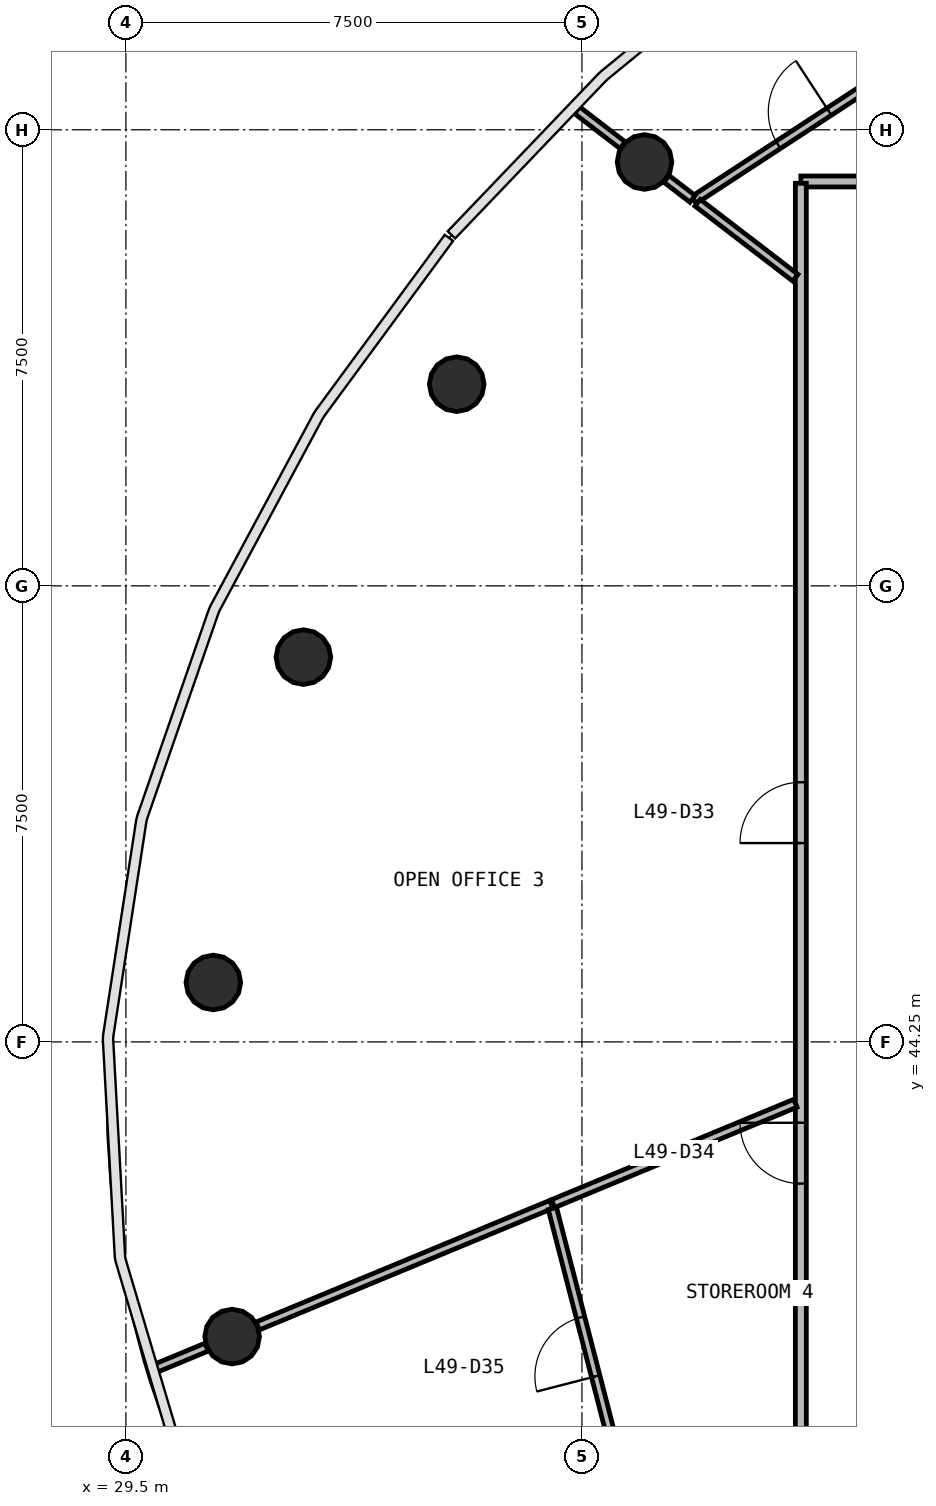
"""IFC4 building model, lengths in metres.
Left out: names, types, materials, properties, quantities, classifications, styles, units other than length and angle.
Written with IfcOpenShell. Run it as: python <this file> out.ifc"""

import sys

from ifc_helpers import new_model, si_unit, direction, frame, frame_2d, origin, origin_2d, place, context, subcontext, project, spatial, rectangle, circle, extrude, source, transform, mapped, element, fill, save


model = new_model("IFC4")
c1 = context("Model", 3, precision=1e-05, world=origin(), true_north=direction((0.0, 1.0)))
c2 = subcontext(c1, "Body", "Model", "MODEL_VIEW")
j1 = project(units=[si_unit("LENGTHUNIT", "METRE"), si_unit("PLANEANGLEUNIT", "RADIAN")], contexts=[c1])
p1 = place(None, origin())
s1 = spatial("IfcSite", under=j1, at=p1, CompositionType="ELEMENT")
p2 = place(p1, origin())
s2 = spatial("IfcBuilding", under=s1, at=p2, CompositionType="ELEMENT")
p3 = place(p2, frame((0.0, 0.0, 203.3)))
s3 = spatial("IfcBuildingStorey", under=s2, at=p3, CompositionType="ELEMENT", Elevation=203.3)
m1 = source(origin(), c2, "Body", "SweptSolid", [
    extrude(circle(Radius=0.45, at=origin_2d()), origin(), (0.0, 0.0, 1.0), 3.9),
])
for number, where, z_axis, x_axis in (
    (1, (38.029, 58.72, 0.0), (0.0, 0.0, 1.0), (1.0, 0.0, 0.0)),
    (2, (34.941, 55.066, 0.0), (0.0, 0.0, 1.0), (1.0, 0.0, 0.0)),
    (3, (32.419, 50.578, 0.0), (0.0, 0.0, 1.0), (1.0, 0.0, 0.0)),
    (4, (30.938, 45.227, 0.0), (0.0, 0.0, 1.0), (1.0, 0.0, 0.0)),
    (5, (31.247, 39.404, 0.0), (0.0, 0.0, 1.0), (1.0, 0.0, 0.0)),
):
    element("IfcColumn", number, at=place(p3, frame(where, z_axis=z_axis, x_axis=x_axis)), inside=s3, PredefinedType="COLUMN", context=c2, shape_type="MappedRepresentation", body=[
        mapped(m1, transform((0.0, 0.0, 0.0), scale=1.0)),
    ])
p4 = place(p3, frame((40.6, 58.4, 0.0), z_axis=(0.0, 0.0, 1.0), x_axis=(1.0, 0.0, 0.0)))
e6 = element("IfcWall", 6, at=p4, inside=s3, PredefinedType="PARTITIONING", context=c2, shape_type="SweptSolid", body=[
    extrude(rectangle(XDim=22.8, YDim=0.18, at=frame_2d((11.4, 0.0))), origin(), (0.0, 0.0, 1.0), 2.88),
])
p5 = place(p4, frame((12.95, 0.0, 0.0)))
e7 = element("IfcOpeningElement", 7, at=p5, cuts=e6, PredefinedType="OPENING", context=c2, shape_type="SweptSolid", body=[
    extrude(rectangle(XDim=1.0, YDim=2.1, at=frame_2d((0.5, 1.05))), frame((0.0, 0.1, 0.0), z_axis=(0.0, -1.0, 0.0), x_axis=(1.0, 0.0, 0.0)), (0.0, 0.0, 1.0), 0.2),
])
p6 = place(p4, frame((10.95, 0.0, 0.0)))
e8 = element("IfcOpeningElement", 8, at=p6, cuts=e6, PredefinedType="OPENING", context=c2, shape_type="SweptSolid", body=[
    extrude(rectangle(XDim=1.0, YDim=2.1, at=frame_2d((0.5, 1.05))), frame((0.0, 0.1, 0.0), z_axis=(0.0, -1.0, 0.0), x_axis=(1.0, 0.0, 0.0)), (0.0, 0.0, 1.0), 0.2),
])
p7 = place(p3, frame((40.6, 37.63, 0.0), z_axis=(0.0, 0.0, 1.0), x_axis=(0.0, 1.0, 0.0)))
e9 = element("IfcWall", 9, at=p7, inside=s3, PredefinedType="PARTITIONING", context=c2, shape_type="SweptSolid", body=[
    extrude(rectangle(XDim=20.74, YDim=0.18, at=frame_2d((10.37, 0.0))), origin(), (0.0, 0.0, 1.0), 2.88),
])
p8 = place(p7, frame((9.89, 0.0, 0.0)))
e10 = element("IfcOpeningElement", 10, at=p8, cuts=e9, PredefinedType="OPENING", context=c2, shape_type="SweptSolid", body=[
    extrude(rectangle(XDim=1.0, YDim=2.1, at=frame_2d((0.5, 1.05))), frame((0.0, 0.1, 0.0), z_axis=(0.0, -1.0, 0.0), x_axis=(1.0, 0.0, 0.0)), (0.0, 0.0, 1.0), 0.2),
])
p9 = place(p7, frame((4.29, 0.0, 0.0)))
e11 = element("IfcOpeningElement", 11, at=p9, cuts=e9, PredefinedType="OPENING", context=c2, shape_type="SweptSolid", body=[
    extrude(rectangle(XDim=1.0, YDim=2.1, at=frame_2d((0.5, 1.05))), frame((0.0, 0.1, 0.0), z_axis=(0.0, -1.0, 0.0), x_axis=(1.0, 0.0, 0.0)), (0.0, 0.0, 1.0), 0.2),
])
p10 = place(p3, frame((36.497, 41.578, 0.0), z_axis=(0.0, 0.0, 1.0), x_axis=(-0.923872241602, -0.382701033703, 0.0)))
e12 = element("IfcWall", 12, at=p10, inside=s3, PredefinedType="PARTITIONING", context=c2, shape_type="SweptSolid", body=[
    extrude(rectangle(XDim=5.227, YDim=0.14, at=frame_2d((2.614, 0.0))), origin(), (0.0, 0.0, 1.0), 2.88),
])
p11 = place(p3, frame((37.676, 37.009, 0.0), z_axis=(0.0, 0.0, 1.0), x_axis=(-0.249819251726, 0.968292487561, 0.0)))
e13 = element("IfcWall", 13, at=p11, inside=s3, PredefinedType="PARTITIONING", context=c2, shape_type="SweptSolid", body=[
    extrude(rectangle(XDim=4.649, YDim=0.14, at=frame_2d((2.324, 0.0))), origin(), (0.0, 0.0, 1.0), 2.88),
])
p12 = place(p11, frame((1.799, 0.0, 0.0)))
e14 = element("IfcOpeningElement", 14, at=p12, cuts=e13, PredefinedType="OPENING", context=c2, shape_type="SweptSolid", body=[
    extrude(rectangle(XDim=1.0, YDim=2.1, at=frame_2d((0.5, 1.05))), frame((0.0, 0.08, 0.0), z_axis=(0.0, -1.0, 0.0), x_axis=(1.0, 0.0, 0.0)), (0.0, 0.0, 1.0), 0.16),
])
p13 = place(p3, frame((40.51, 43.241, 0.0), z_axis=(0.0, 0.0, 1.0), x_axis=(-0.923880260939, -0.382681673781, 0.0)))
e15 = element("IfcWall", 15, at=p13, inside=s3, PredefinedType="PARTITIONING", context=c2, shape_type="SweptSolid", body=[
    extrude(rectangle(XDim=4.314, YDim=0.14, at=frame_2d((2.157, 0.0))), origin(), (0.0, 0.0, 1.0), 2.88),
])
p14 = place(p3, frame((38.843, 58.096, 0.0), z_axis=(0.0, 0.0, 1.0), x_axis=(0.83707650684, 0.547085844907, 0.0)))
e16 = element("IfcWall", 16, at=p14, inside=s3, PredefinedType="PARTITIONING", context=c2, shape_type="SweptSolid", body=[
    extrude(rectangle(XDim=4.305, YDim=0.14, at=frame_2d((2.152, 0.0))), origin(), (0.0, 0.0, 1.0), 2.88),
])
p15 = place(p14, frame((1.655, 0.0, 0.0)))
e17 = element("IfcOpeningElement", 17, at=p15, cuts=e16, PredefinedType="OPENING", context=c2, shape_type="SweptSolid", body=[
    extrude(rectangle(XDim=1.0, YDim=2.1, at=frame_2d((0.5, 1.05))), frame((0.0, 0.08, 0.0), z_axis=(0.0, -1.0, 0.0), x_axis=(1.0, 0.0, 0.0)), (0.0, 0.0, 1.0), 0.16),
])
p16 = place(p3, frame((38.39, 58.444, 0.0), z_axis=(0.0, 0.0, 1.0), x_axis=(0.793294129055, -0.608838586825, 0.0)))
e18 = element("IfcWall", 18, at=p16, inside=s3, PredefinedType="PARTITIONING", context=c2, shape_type="SweptSolid", body=[
    extrude(rectangle(XDim=0.541, YDim=0.14, at=frame_2d((0.271, 0.0))), origin(), (0.0, 0.0, 1.0), 2.88),
])
p17 = place(p3, frame((38.902, 58.051, 0.0), z_axis=(0.0, 0.0, 1.0), x_axis=(0.7933756116, -0.608732403374, 0.0)))
e19 = element("IfcWall", 19, at=p17, inside=s3, PredefinedType="PARTITIONING", context=c2, shape_type="SweptSolid", body=[
    extrude(rectangle(XDim=2.027, YDim=0.14, at=frame_2d((1.013, 0.0))), origin(), (0.0, 0.0, 1.0), 2.88),
])
p18 = place(p3, frame((30.826, 39.23, 0.0), z_axis=(0.0, 0.0, 1.0), x_axis=(-0.923779659408, -0.38292445843, 0.0)))
e20 = element("IfcWall", 20, at=p18, inside=s3, PredefinedType="PARTITIONING", context=c2, shape_type="SweptSolid", body=[
    extrude(rectangle(XDim=0.954, YDim=0.14, at=frame_2d((0.477, 0.0))), origin(), (0.0, 0.0, 1.0), 2.88),
])
p19 = place(p3, frame((37.668, 58.997, 0.0), z_axis=(0.0, 0.0, 1.0), x_axis=(-0.793344167197, 0.608773383431, 0.0)))
e21 = element("IfcWall", 21, at=p19, inside=s3, PredefinedType="PARTITIONING", context=c2, shape_type="SweptSolid", body=[
    extrude(rectangle(XDim=0.944, YDim=0.14, at=frame_2d((0.472, 0.0))), origin(), (0.0, 0.0, 1.0), 2.88),
])
m2 = source(origin(), c2, "Body", "SweptSolid", [
    extrude(rectangle(XDim=1.0, YDim=2.1, at=frame_2d((0.5, 1.05))), frame((0.0, 0.025, 0.0), z_axis=(0.0, -1.0, 0.0), x_axis=(1.0, 0.0, 0.0)), (0.0, 0.0, 1.0), 0.05),
])
p20 = place(p15, origin())
e22 = element("IfcDoor", 22, at=p20, inside=s3, OperationType="SINGLE_SWING_RIGHT", PredefinedType="DOOR", context=c2, shape_type="MappedRepresentation", body=[
    mapped(m2, transform((0.0, 0.0, 0.0), scale=1.0)),
])
fill(e17, e22)
p21 = place(p8, origin())
e23 = element("IfcDoor", 23, at=p21, inside=s3, OperationType="SINGLE_SWING_LEFT", PredefinedType="DOOR", context=c2, shape_type="MappedRepresentation", body=[
    mapped(m2, transform((0.0, 0.0, 0.0), scale=1.0)),
])
fill(e10, e23)
p22 = place(p9, origin())
e24 = element("IfcDoor", 24, at=p22, inside=s3, OperationType="SINGLE_SWING_RIGHT", PredefinedType="DOOR", context=c2, shape_type="MappedRepresentation", body=[
    mapped(m2, transform((0.0, 0.0, 0.0), scale=1.0)),
])
fill(e11, e24)
p23 = place(p12, origin())
e25 = element("IfcDoor", 25, at=p23, inside=s3, OperationType="SINGLE_SWING_LEFT", PredefinedType="DOOR", context=c2, shape_type="MappedRepresentation", body=[
    mapped(m2, transform((0.0, 0.0, 0.0), scale=1.0)),
])
fill(e14, e25)
save(model, sys.argv[1])
